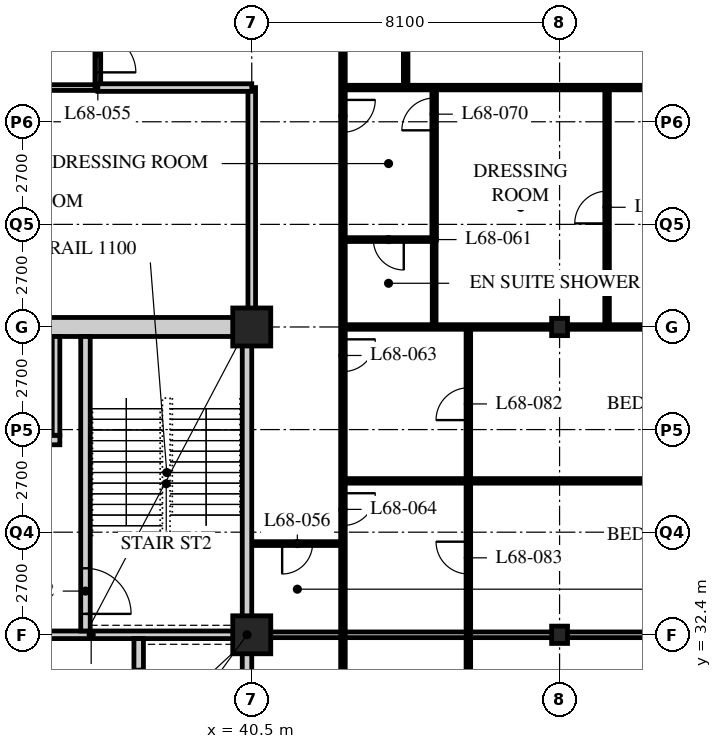
"""IFC4 building model, lengths in metres.
Left out: names, types, materials, properties, quantities, classifications, styles, units other than length and angle.
Written with IfcOpenShell. Run it as: python <this file> out.ifc"""

import sys

from ifc_helpers import new_model, si_unit, direction, frame, frame_2d, origin, origin_2d, place, context, subcontext, project, spatial, rectangle, hollow_rectangle, i_section, extrude, element, fill, save


model = new_model("IFC4")
c1 = context("Model", 3, precision=1e-05, world=origin(), true_north=direction((0.0, 1.0)))
c2 = subcontext(c1, "Body", "Model", "MODEL_VIEW")
j1 = project(units=[si_unit("LENGTHUNIT", "METRE"), si_unit("PLANEANGLEUNIT", "RADIAN")], contexts=[c1])
p1 = place(None, origin())
s1 = spatial("IfcSite", under=j1, at=p1, CompositionType="ELEMENT")
p2 = place(p1, origin())
s2 = spatial("IfcBuilding", under=s1, at=p2, CompositionType="ELEMENT")
p3 = place(p2, frame((0.0, 0.0, 265.8)))
s3 = spatial("IfcBuildingStorey", under=s2, at=p3, CompositionType="ELEMENT", Elevation=265.8)
for number, where, z_axis, x_axis in (
    (1, (40.5, 32.4, 0.0), (0.0, 0.0, 1.0), (1.0, 0.0, 0.0)),
    (2, (40.5, 40.5, 0.0), (0.0, 0.0, 1.0), (1.0, 0.0, 0.0)),
):
    element("IfcColumn", number, at=place(p3, frame(where, z_axis=z_axis, x_axis=x_axis)), inside=s3, PredefinedType="COLUMN", context=c2, shape_type="SweptSolid", body=[
        extrude(hollow_rectangle(XDim=1.0, YDim=1.0, WallThickness=0.1, at=origin_2d()), origin(), (0.0, 0.0, 1.0), 3.9),
    ])
for number, where, z_axis, x_axis in (
    (3, (48.6, 32.4, 0.0), (0.0, 0.0, 1.0), (1.0, 0.0, 0.0)),
    (4, (48.6, 40.5, 0.0), (0.0, 0.0, 1.0), (1.0, 0.0, 0.0)),
):
    element("IfcColumn", number, at=place(p3, frame(where, z_axis=z_axis, x_axis=x_axis)), inside=s3, PredefinedType="COLUMN", context=c2, shape_type="SweptSolid", body=[
        extrude(i_section(OverallWidth=0.418, OverallDepth=0.456, WebThickness=0.042, FlangeThickness=0.067, FilletRadius=0.015, at=origin_2d()), origin(), (0.0, 0.0, 1.0), 3.9),
    ])
p4 = place(p3, frame((29.56, 46.8, 0.0), z_axis=(0.0, 0.0, 1.0), x_axis=(1.0, 0.0, 0.0)))
e5 = element("IfcWall", 5, at=p4, inside=s3, PredefinedType="PARTITIONING", context=c2, shape_type="SweptSolid", body=[
    extrude(rectangle(XDim=6.89, YDim=0.15, at=frame_2d((3.445, 0.0))), origin(), (0.0, 0.0, 1.0), 3.69),
])
p5 = place(p4, frame((0.442, 0.0, 0.0)))
e6 = element("IfcOpeningElement", 6, at=p5, cuts=e5, PredefinedType="OPENING", context=c2, shape_type="SweptSolid", body=[
    extrude(rectangle(XDim=1.0, YDim=2.1, at=frame_2d((0.5, 1.05))), frame((0.0, 0.085, 0.0), z_axis=(0.0, -1.0, 0.0), x_axis=(1.0, 0.0, 0.0)), (0.0, 0.0, 1.0), 0.17),
])
p6 = place(p4, frame((3.642, 0.0, 0.0)))
e7 = element("IfcOpeningElement", 7, at=p6, cuts=e5, PredefinedType="OPENING", context=c2, shape_type="SweptSolid", body=[
    extrude(rectangle(XDim=1.0, YDim=2.1, at=frame_2d((0.5, 1.05))), frame((0.0, 0.085, 0.0), z_axis=(0.0, -1.0, 0.0), x_axis=(1.0, 0.0, 0.0)), (0.0, 0.0, 1.0), 0.17),
])
p7 = place(p3, frame((36.45, 46.8, 0.0), z_axis=(0.0, 0.0, 1.0), x_axis=(0.0, 1.0, 0.0)))
e8 = element("IfcWall", 8, at=p7, inside=s3, PredefinedType="PARTITIONING", context=c2, shape_type="SweptSolid", body=[
    extrude(rectangle(XDim=1.8, YDim=0.15, at=frame_2d((0.9, 0.0))), origin(), (0.0, 0.0, 1.0), 3.69),
])
p8 = place(p7, frame((0.4, 0.0, 0.0)))
e9 = element("IfcOpeningElement", 9, at=p8, cuts=e8, PredefinedType="OPENING", context=c2, shape_type="SweptSolid", body=[
    extrude(rectangle(XDim=1.0, YDim=2.1, at=frame_2d((0.5, 1.05))), frame((0.0, 0.085, 0.0), z_axis=(0.0, -1.0, 0.0), x_axis=(1.0, 0.0, 0.0)), (0.0, 0.0, 1.0), 0.17),
])
p9 = place(p3, frame((40.5, 40.5, 0.0), z_axis=(0.0, 0.0, 1.0), x_axis=(0.0, 1.0, 0.0)))
e10 = element("IfcWall", 10, at=p9, inside=s3, PredefinedType="SOLIDWALL", context=c2, shape_type="SweptSolid", body=[
    extrude(rectangle(XDim=6.3, YDim=0.2, at=frame_2d((3.15, 0.0))), origin(), (0.0, 0.0, 1.0), 3.078),
])
p10 = place(p3, frame((42.9, 22.5, 0.0), z_axis=(0.0, 0.0, 1.0), x_axis=(0.0, 1.0, 0.0)))
e11 = element("IfcWall", 11, at=p10, inside=s3, PredefinedType="PARTITIONING", context=c2, shape_type="SweptSolid", body=[
    extrude(rectangle(XDim=9.9, YDim=0.12, at=frame_2d((4.95, 0.0))), origin(), (0.0, 0.0, 1.0), 3.69),
])
p11 = place(p10, frame((2.125, 0.0, 0.0)))
e12 = element("IfcOpeningElement", 12, at=p11, cuts=e11, PredefinedType="OPENING", context=c2, shape_type="SweptSolid", body=[
    extrude(rectangle(XDim=0.85, YDim=2.1, at=frame_2d((0.425, 1.05))), frame((0.0, 0.07, 0.0), z_axis=(0.0, -1.0, 0.0), x_axis=(1.0, 0.0, 0.0)), (0.0, 0.0, 1.0), 0.14),
])
p12 = place(p10, frame((6.175, 0.0, 0.0)))
e13 = element("IfcOpeningElement", 13, at=p12, cuts=e11, PredefinedType="OPENING", context=c2, shape_type="SweptSolid", body=[
    extrude(rectangle(XDim=0.85, YDim=2.1, at=frame_2d((0.425, 1.05))), frame((0.0, 0.07, 0.0), z_axis=(0.0, -1.0, 0.0), x_axis=(1.0, 0.0, 0.0)), (0.0, 0.0, 1.0), 0.14),
])
p13 = place(p3, frame((40.5, 32.4, 0.0), z_axis=(0.0, 0.0, 1.0), x_axis=(1.0, 0.0, 0.0)))
e14 = element("IfcWall", 14, at=p13, inside=s3, PredefinedType="PARTITIONING", context=c2, shape_type="SweptSolid", body=[
    extrude(rectangle(XDim=15.9, YDim=0.15, at=frame_2d((7.95, 0.0))), origin(), (0.0, 0.0, 1.0), 3.078),
])
p14 = place(p3, frame((40.5, 34.8, 0.0), z_axis=(0.0, 0.0, 1.0), x_axis=(1.0, 0.0, 0.0)))
e15 = element("IfcWall", 15, at=p14, inside=s3, PredefinedType="PARTITIONING", context=c2, shape_type="SweptSolid", body=[
    extrude(rectangle(XDim=2.4, YDim=0.1, at=frame_2d((1.2, 0.0))), origin(), (0.0, 0.0, 1.0), 3.69),
])
p15 = place(p14, frame((0.8, 0.0, 0.0)))
e16 = element("IfcOpeningElement", 16, at=p15, cuts=e15, PredefinedType="OPENING", context=c2, shape_type="SweptSolid", body=[
    extrude(rectangle(XDim=0.8, YDim=2.1, at=frame_2d((0.4, 1.05))), frame((0.0, 0.06, 0.0), z_axis=(0.0, -1.0, 0.0), x_axis=(1.0, 0.0, 0.0)), (0.0, 0.0, 1.0), 0.12),
])
p16 = place(p3, frame((42.9, 48.6, 0.0), z_axis=(0.0, 0.0, 1.0), x_axis=(0.0, -1.0, 0.0)))
e17 = element("IfcWall", 17, at=p16, inside=s3, PredefinedType="PARTITIONING", context=c2, shape_type="SweptSolid", body=[
    extrude(rectangle(XDim=16.2, YDim=0.12, at=frame_2d((8.1, 0.0))), origin(), (0.0, 0.0, 1.0), 3.69),
])
p17 = place(p16, frame((2.125, 0.0, 0.0)))
e18 = element("IfcOpeningElement", 18, at=p17, cuts=e17, PredefinedType="OPENING", context=c2, shape_type="SweptSolid", body=[
    extrude(rectangle(XDim=0.85, YDim=2.1, at=frame_2d((0.425, 1.05))), frame((0.0, 0.07, 0.0), z_axis=(0.0, -1.0, 0.0), x_axis=(1.0, 0.0, 0.0)), (0.0, 0.0, 1.0), 0.14),
])
p18 = place(p16, frame((8.425, 0.0, 0.0)))
e19 = element("IfcOpeningElement", 19, at=p18, cuts=e17, PredefinedType="OPENING", context=c2, shape_type="SweptSolid", body=[
    extrude(rectangle(XDim=0.85, YDim=2.1, at=frame_2d((0.425, 1.05))), frame((0.0, 0.07, 0.0), z_axis=(0.0, -1.0, 0.0), x_axis=(1.0, 0.0, 0.0)), (0.0, 0.0, 1.0), 0.14),
])
p19 = place(p16, frame((12.475, 0.0, 0.0)))
e20 = element("IfcOpeningElement", 20, at=p19, cuts=e17, PredefinedType="OPENING", context=c2, shape_type="SweptSolid", body=[
    extrude(rectangle(XDim=0.85, YDim=2.1, at=frame_2d((0.425, 1.05))), frame((0.0, 0.07, 0.0), z_axis=(0.0, -1.0, 0.0), x_axis=(1.0, 0.0, 0.0)), (0.0, 0.0, 1.0), 0.14),
])
p20 = place(p3, frame((36.45, 46.8, 0.0), z_axis=(0.0, 0.0, 1.0), x_axis=(1.0, 0.0, 0.0)))
e21 = element("IfcWall", 21, at=p20, inside=s3, PredefinedType="SOLIDWALL", context=c2, shape_type="SweptSolid", body=[
    extrude(rectangle(XDim=4.05, YDim=0.2, at=frame_2d((2.025, 0.0))), origin(), (0.0, 0.0, 1.0), 3.69),
])
p21 = place(p3, frame((42.9, 46.8, 0.0), z_axis=(0.0, 0.0, 1.0), x_axis=(1.0, 0.0, 0.0)))
e22 = element("IfcWall", 22, at=p21, inside=s3, PredefinedType="PARTITIONING", context=c2, shape_type="SweptSolid", body=[
    extrude(rectangle(XDim=13.5, YDim=0.12, at=frame_2d((6.75, 0.0))), origin(), (0.0, 0.0, 1.0), 3.69),
])
p22 = place(p3, frame((44.55, 64.5, 0.0), z_axis=(0.0, 0.0, 1.0), x_axis=(0.0, -1.0, 0.0)))
e23 = element("IfcWall", 23, at=p22, inside=s3, PredefinedType="PARTITIONING", context=c2, shape_type="SweptSolid", body=[
    extrude(rectangle(XDim=17.7, YDim=0.12, at=frame_2d((8.85, 0.0))), origin(), (0.0, 0.0, 1.0), 3.69),
])
p23 = place(p22, frame((12.475, 0.0, 0.0)))
e24 = element("IfcOpeningElement", 24, at=p23, cuts=e23, PredefinedType="OPENING", context=c2, shape_type="SweptSolid", body=[
    extrude(rectangle(XDim=0.85, YDim=2.1, at=frame_2d((0.425, 1.05))), frame((0.0, 0.07, 0.0), z_axis=(0.0, -1.0, 0.0), x_axis=(1.0, 0.0, 0.0)), (0.0, 0.0, 1.0), 0.14),
])
p24 = place(p22, frame((4.525, 0.0, 0.0)))
e25 = element("IfcOpeningElement", 25, at=p24, cuts=e23, PredefinedType="OPENING", context=c2, shape_type="SweptSolid", body=[
    extrude(rectangle(XDim=0.85, YDim=2.1, at=frame_2d((0.425, 1.05))), frame((0.0, 0.07, 0.0), z_axis=(0.0, -1.0, 0.0), x_axis=(1.0, 0.0, 0.0)), (0.0, 0.0, 1.0), 0.14),
])
p25 = place(p3, frame((42.9, 42.8, 0.0), z_axis=(0.0, 0.0, 1.0), x_axis=(1.0, 0.0, 0.0)))
e26 = element("IfcWall", 26, at=p25, inside=s3, PredefinedType="PARTITIONING", context=c2, shape_type="SweptSolid", body=[
    extrude(rectangle(XDim=2.4, YDim=0.1, at=frame_2d((1.2, 0.0))), origin(), (0.0, 0.0, 1.0), 3.69),
])
p26 = place(p25, frame((0.8, 0.0, 0.0)))
e27 = element("IfcOpeningElement", 27, at=p26, cuts=e26, PredefinedType="OPENING", context=c2, shape_type="SweptSolid", body=[
    extrude(rectangle(XDim=0.8, YDim=2.1, at=frame_2d((0.4, 1.05))), frame((0.0, 0.06, 0.0), z_axis=(0.0, -1.0, 0.0), x_axis=(1.0, 0.0, 0.0)), (0.0, 0.0, 1.0), 0.12),
])
p27 = place(p3, frame((45.3, 42.8, 0.0), z_axis=(0.0, 0.0, 1.0), x_axis=(0.0, -1.0, 0.0)))
e28 = element("IfcWall", 28, at=p27, inside=s3, PredefinedType="PARTITIONING", context=c2, shape_type="SweptSolid", body=[
    extrude(rectangle(XDim=2.3, YDim=0.1, at=frame_2d((1.15, 0.0))), origin(), (0.0, 0.0, 1.0), 3.69),
])
p28 = place(p3, frame((42.9, 40.5, 0.0), z_axis=(0.0, 0.0, 1.0), x_axis=(1.0, 0.0, 0.0)))
e29 = element("IfcWall", 29, at=p28, inside=s3, PredefinedType="PARTITIONING", context=c2, shape_type="SweptSolid", body=[
    extrude(rectangle(XDim=13.5, YDim=0.12, at=frame_2d((6.75, 0.0))), origin(), (0.0, 0.0, 1.0), 3.078),
])
p29 = place(p3, frame((42.9, 36.45, 0.0), z_axis=(0.0, 0.0, 1.0), x_axis=(1.0, 0.0, 0.0)))
e30 = element("IfcWall", 30, at=p29, inside=s3, PredefinedType="PARTITIONING", context=c2, shape_type="SweptSolid", body=[
    extrude(rectangle(XDim=13.5, YDim=0.12, at=frame_2d((6.75, 0.0))), origin(), (0.0, 0.0, 1.0), 3.69),
])
p30 = place(p3, frame((45.3, 46.8, 0.0), z_axis=(0.0, 0.0, 1.0), x_axis=(0.0, -1.0, 0.0)))
e31 = element("IfcWall", 31, at=p30, inside=s3, PredefinedType="PARTITIONING", context=c2, shape_type="SweptSolid", body=[
    extrude(rectangle(XDim=4.01, YDim=0.12, at=frame_2d((2.005, 0.0))), origin(), (0.0, 0.0, 1.0), 3.69),
])
p31 = place(p30, frame((0.275, 0.0, 0.0)))
e32 = element("IfcOpeningElement", 32, at=p31, cuts=e31, PredefinedType="OPENING", context=c2, shape_type="SweptSolid", body=[
    extrude(rectangle(XDim=0.85, YDim=2.1, at=frame_2d((0.425, 1.05))), frame((0.0, 0.07, 0.0), z_axis=(0.0, -1.0, 0.0), x_axis=(1.0, 0.0, 0.0)), (0.0, 0.0, 1.0), 0.14),
])
p32 = place(p3, frame((46.2, 28.35, 0.0), z_axis=(0.0, 0.0, 1.0), x_axis=(0.0, 1.0, 0.0)))
e33 = element("IfcWall", 33, at=p32, inside=s3, PredefinedType="PARTITIONING", context=c2, shape_type="SweptSolid", body=[
    extrude(rectangle(XDim=12.15, YDim=0.12, at=frame_2d((6.075, 0.0))), origin(), (0.0, 0.0, 1.0), 3.69),
])
p33 = place(p32, frame((1.6, 0.0, 0.0)))
e34 = element("IfcOpeningElement", 34, at=p33, cuts=e33, PredefinedType="OPENING", context=c2, shape_type="SweptSolid", body=[
    extrude(rectangle(XDim=0.85, YDim=2.1, at=frame_2d((0.425, 1.05))), frame((0.0, 0.07, 0.0), z_axis=(0.0, -1.0, 0.0), x_axis=(1.0, 0.0, 0.0)), (0.0, 0.0, 1.0), 0.14),
])
p34 = place(p32, frame((9.7, 0.0, 0.0)))
e35 = element("IfcOpeningElement", 35, at=p34, cuts=e33, PredefinedType="OPENING", context=c2, shape_type="SweptSolid", body=[
    extrude(rectangle(XDim=0.85, YDim=2.1, at=frame_2d((0.425, 1.05))), frame((0.0, 0.07, 0.0), z_axis=(0.0, -1.0, 0.0), x_axis=(1.0, 0.0, 0.0)), (0.0, 0.0, 1.0), 0.14),
])
p35 = place(p32, frame((5.65, 0.0, 0.0)))
e36 = element("IfcOpeningElement", 36, at=p35, cuts=e33, PredefinedType="OPENING", context=c2, shape_type="SweptSolid", body=[
    extrude(rectangle(XDim=0.85, YDim=2.1, at=frame_2d((0.425, 1.05))), frame((0.0, 0.07, 0.0), z_axis=(0.0, -1.0, 0.0), x_axis=(1.0, 0.0, 0.0)), (0.0, 0.0, 1.0), 0.14),
])
p36 = place(p3, frame((49.85, 40.5, 0.0), z_axis=(0.0, 0.0, 1.0), x_axis=(0.0, 1.0, 0.0)))
e37 = element("IfcWall", 37, at=p36, inside=s3, PredefinedType="PARTITIONING", context=c2, shape_type="SweptSolid", body=[
    extrude(rectangle(XDim=6.3, YDim=0.12, at=frame_2d((3.15, 0.0))), origin(), (0.0, 0.0, 1.0), 3.69),
])
p37 = place(p36, frame((2.725, 0.0, 0.0)))
e38 = element("IfcOpeningElement", 38, at=p37, cuts=e37, PredefinedType="OPENING", context=c2, shape_type="SweptSolid", body=[
    extrude(rectangle(XDim=0.85, YDim=2.1, at=frame_2d((0.425, 1.05))), frame((0.0, 0.07, 0.0), z_axis=(0.0, -1.0, 0.0), x_axis=(1.0, 0.0, 0.0)), (0.0, 0.0, 1.0), 0.14),
])
p38 = place(p3, frame((15.95, 40.5, 0.0), z_axis=(0.0, 0.0, 1.0), x_axis=(1.0, 0.0, 0.0)))
e39 = element("IfcWall", 39, at=p38, inside=s3, PredefinedType="SOLIDWALL", context=c2, shape_type="SweptSolid", body=[
    extrude(rectangle(XDim=24.55, YDim=0.5, at=frame_2d((12.275, 0.0))), origin(), (0.0, 0.0, 1.0), 3.04),
])
p39 = place(p38, frame((11.5, 0.0, 0.0)))
e40 = element("IfcOpeningElement", 40, at=p39, cuts=e39, PredefinedType="OPENING", context=c2, shape_type="SweptSolid", body=[
    extrude(rectangle(XDim=1.8, YDim=2.4, at=frame_2d((0.9, 1.2))), frame((0.0, 0.26, 0.0), z_axis=(0.0, -1.0, 0.0), x_axis=(1.0, 0.0, 0.0)), (0.0, 0.0, 1.0), 0.52),
])
p40 = place(p3, frame((40.375, 24.55, 0.0), z_axis=(0.0, 0.0, 1.0), x_axis=(0.0, 1.0, 0.0)))
e41 = element("IfcWall", 41, at=p40, inside=s3, PredefinedType="SOLIDWALL", context=c2, shape_type="SweptSolid", body=[
    extrude(rectangle(XDim=15.7, YDim=0.25, at=frame_2d((7.85, 0.0))), origin(), (0.0, 0.0, 1.0), 3.078),
])
p41 = place(p3, frame((32.3, 32.4, 0.0), z_axis=(0.0, 0.0, 1.0), x_axis=(1.0, 0.0, 0.0)))
e42 = element("IfcWall", 42, at=p41, inside=s3, PredefinedType="SOLIDWALL", context=c2, shape_type="SweptSolid", body=[
    extrude(rectangle(XDim=7.95, YDim=0.2, at=frame_2d((3.975, 0.0))), origin(), (0.0, 0.0, 1.0), 3.078),
])
p42 = place(p3, frame((37.525, 24.55, 0.0), z_axis=(0.0, 0.0, 1.0), x_axis=(0.0, 1.0, 0.0)))
e43 = element("IfcWall", 43, at=p42, inside=s3, PredefinedType="SOLIDWALL", context=c2, shape_type="SweptSolid", body=[
    extrude(rectangle(XDim=7.75, YDim=0.25, at=frame_2d((3.875, 0.0))), origin(), (0.0, 0.0, 1.0), 3.69),
])
p43 = place(p42, frame((0.65, 0.0, 0.0)))
e44 = element("IfcOpeningElement", 44, at=p43, cuts=e43, PredefinedType="OPENING", context=c2, shape_type="SweptSolid", body=[
    extrude(rectangle(XDim=1.1, YDim=2.4, at=frame_2d((0.55, 1.2))), frame((0.0, 0.135, 0.0), z_axis=(0.0, -1.0, 0.0), x_axis=(1.0, 0.0, 0.0)), (0.0, 0.0, 1.0), 0.27),
])
p44 = place(p42, frame((3.25, 0.0, 0.0)))
e45 = element("IfcOpeningElement", 45, at=p44, cuts=e43, PredefinedType="OPENING", context=c2, shape_type="SweptSolid", body=[
    extrude(rectangle(XDim=1.1, YDim=2.4, at=frame_2d((0.55, 1.2))), frame((0.0, 0.135, 0.0), z_axis=(0.0, -1.0, 0.0), x_axis=(1.0, 0.0, 0.0)), (0.0, 0.0, 1.0), 0.27),
])
p45 = place(p42, frame((5.85, 0.0, 0.0)))
e46 = element("IfcOpeningElement", 46, at=p45, cuts=e43, PredefinedType="OPENING", context=c2, shape_type="SweptSolid", body=[
    extrude(rectangle(XDim=1.1, YDim=2.4, at=frame_2d((0.55, 1.2))), frame((0.0, 0.135, 0.0), z_axis=(0.0, -1.0, 0.0), x_axis=(1.0, 0.0, 0.0)), (0.0, 0.0, 1.0), 0.27),
])
p46 = place(p3, frame((36.125, 32.5, 0.0), z_axis=(0.0, 0.0, 1.0), x_axis=(0.0, 1.0, 0.0)))
e47 = element("IfcWall", 47, at=p46, inside=s3, PredefinedType="SOLIDWALL", context=c2, shape_type="SweptSolid", body=[
    extrude(rectangle(XDim=7.75, YDim=0.25, at=frame_2d((3.875, 0.0))), origin(), (0.0, 0.0, 1.0), 3.69),
])
p47 = place(p46, frame((0.45, 0.0, 0.0)))
e48 = element("IfcOpeningElement", 48, at=p47, cuts=e47, PredefinedType="OPENING", context=c2, shape_type="SweptSolid", body=[
    extrude(rectangle(XDim=1.2, YDim=2.1, at=frame_2d((0.6, 1.05))), frame((0.0, 0.135, 0.0), z_axis=(0.0, -1.0, 0.0), x_axis=(1.0, 0.0, 0.0)), (0.0, 0.0, 1.0), 0.27),
])
p48 = place(p3, frame((32.5, 37.525, 0.0), z_axis=(0.0, 0.0, 1.0), x_axis=(1.0, 0.0, 0.0)))
e49 = element("IfcWall", 49, at=p48, inside=s3, PredefinedType="SOLIDWALL", context=c2, shape_type="SweptSolid", body=[
    extrude(rectangle(XDim=2.95, YDim=0.25, at=frame_2d((1.475, 0.0))), origin(), (0.0, 0.0, 1.0), 3.69),
])
p49 = place(p48, frame((0.9, 0.0, 0.0)))
e50 = element("IfcOpeningElement", 50, at=p49, cuts=e49, PredefinedType="OPENING", context=c2, shape_type="SweptSolid", body=[
    extrude(rectangle(XDim=1.1, YDim=2.4, at=frame_2d((0.55, 1.2))), frame((0.0, 0.135, 0.0), z_axis=(0.0, -1.0, 0.0), x_axis=(1.0, 0.0, 0.0)), (0.0, 0.0, 1.0), 0.27),
])
p50 = place(p3, frame((35.35, 37.65, 0.0), z_axis=(0.0, 0.0, 1.0), x_axis=(0.0, 1.0, 0.0)))
e51 = element("IfcWall", 51, at=p50, inside=s3, PredefinedType="SOLIDWALL", context=c2, shape_type="SweptSolid", body=[
    extrude(rectangle(XDim=2.6, YDim=0.2, at=frame_2d((1.3, 0.0))), origin(), (0.0, 0.0, 1.0), 3.69),
])
p51 = place(p8, origin())
e52 = element("IfcDoor", 52, at=p51, inside=s3, OperationType="SINGLE_SWING_RIGHT", PredefinedType="DOOR", context=c2, shape_type="SweptSolid", body=[
    extrude(rectangle(XDim=1.0, YDim=2.1, at=frame_2d((0.5, 1.05))), frame((0.0, 0.025, 0.0), z_axis=(0.0, -1.0, 0.0), x_axis=(1.0, 0.0, 0.0)), (0.0, 0.0, 1.0), 0.05),
])
fill(e9, e52)
p52 = place(p15, origin())
e53 = element("IfcDoor", 53, at=p52, inside=s3, OperationType="SINGLE_SWING_RIGHT", PredefinedType="DOOR", context=c2, shape_type="SweptSolid", body=[
    extrude(rectangle(XDim=0.8, YDim=2.1, at=frame_2d((0.4, 1.05))), frame((0.0, 0.025, 0.0), z_axis=(0.0, -1.0, 0.0), x_axis=(1.0, 0.0, 0.0)), (0.0, 0.0, 1.0), 0.05),
])
fill(e16, e53)
p53 = place(p26, origin())
e54 = element("IfcDoor", 54, at=p53, inside=s3, OperationType="SINGLE_SWING_LEFT", PredefinedType="DOOR", context=c2, shape_type="SweptSolid", body=[
    extrude(rectangle(XDim=0.8, YDim=2.1, at=frame_2d((0.4, 1.05))), frame((0.0, 0.025, 0.0), z_axis=(0.0, -1.0, 0.0), x_axis=(1.0, 0.0, 0.0)), (0.0, 0.0, 1.0), 0.05),
])
fill(e27, e54)
p54 = place(p17, origin())
e55 = element("IfcDoor", 55, at=p54, inside=s3, OperationType="SINGLE_SWING_LEFT", PredefinedType="DOOR", context=c2, shape_type="SweptSolid", body=[
    extrude(rectangle(XDim=0.85, YDim=2.1, at=frame_2d((0.425, 1.05))), frame((0.0, 0.025, 0.0), z_axis=(0.0, -1.0, 0.0), x_axis=(1.0, 0.0, 0.0)), (0.0, 0.0, 1.0), 0.05),
])
fill(e18, e55)
p55 = place(p18, origin())
e56 = element("IfcDoor", 56, at=p55, inside=s3, OperationType="SINGLE_SWING_LEFT", PredefinedType="DOOR", context=c2, shape_type="SweptSolid", body=[
    extrude(rectangle(XDim=0.85, YDim=2.1, at=frame_2d((0.425, 1.05))), frame((0.0, 0.025, 0.0), z_axis=(0.0, -1.0, 0.0), x_axis=(1.0, 0.0, 0.0)), (0.0, 0.0, 1.0), 0.05),
])
fill(e19, e56)
p56 = place(p19, origin())
e57 = element("IfcDoor", 57, at=p56, inside=s3, OperationType="SINGLE_SWING_LEFT", PredefinedType="DOOR", context=c2, shape_type="SweptSolid", body=[
    extrude(rectangle(XDim=0.85, YDim=2.1, at=frame_2d((0.425, 1.05))), frame((0.0, 0.025, 0.0), z_axis=(0.0, -1.0, 0.0), x_axis=(1.0, 0.0, 0.0)), (0.0, 0.0, 1.0), 0.05),
])
fill(e20, e57)
p57 = place(p31, origin())
e58 = element("IfcDoor", 58, at=p57, inside=s3, OperationType="SINGLE_SWING_LEFT", PredefinedType="DOOR", context=c2, shape_type="SweptSolid", body=[
    extrude(rectangle(XDim=0.85, YDim=2.1, at=frame_2d((0.425, 1.05))), frame((0.0, 0.025, 0.0), z_axis=(0.0, -1.0, 0.0), x_axis=(1.0, 0.0, 0.0)), (0.0, 0.0, 1.0), 0.05),
])
fill(e32, e58)
p58 = place(p37, origin())
e59 = element("IfcDoor", 59, at=p58, inside=s3, OperationType="SINGLE_SWING_LEFT", PredefinedType="DOOR", context=c2, shape_type="SweptSolid", body=[
    extrude(rectangle(XDim=0.85, YDim=2.1, at=frame_2d((0.425, 1.05))), frame((0.0, 0.025, 0.0), z_axis=(0.0, -1.0, 0.0), x_axis=(1.0, 0.0, 0.0)), (0.0, 0.0, 1.0), 0.05),
])
fill(e38, e59)
p59 = place(p34, origin())
e60 = element("IfcDoor", 60, at=p59, inside=s3, OperationType="SINGLE_SWING_LEFT", PredefinedType="DOOR", context=c2, shape_type="SweptSolid", body=[
    extrude(rectangle(XDim=0.85, YDim=2.1, at=frame_2d((0.425, 1.05))), frame((0.0, 0.025, 0.0), z_axis=(0.0, -1.0, 0.0), x_axis=(1.0, 0.0, 0.0)), (0.0, 0.0, 1.0), 0.05),
])
fill(e35, e60)
p60 = place(p35, origin())
e61 = element("IfcDoor", 61, at=p60, inside=s3, OperationType="SINGLE_SWING_RIGHT", PredefinedType="DOOR", context=c2, shape_type="SweptSolid", body=[
    extrude(rectangle(XDim=0.85, YDim=2.1, at=frame_2d((0.425, 1.05))), frame((0.0, 0.025, 0.0), z_axis=(0.0, -1.0, 0.0), x_axis=(1.0, 0.0, 0.0)), (0.0, 0.0, 1.0), 0.05),
])
fill(e36, e61)
p61 = place(p47, origin())
e62 = element("IfcDoor", 62, at=p61, inside=s3, OperationType="SINGLE_SWING_RIGHT", PredefinedType="DOOR", context=c2, shape_type="SweptSolid", body=[
    extrude(rectangle(XDim=1.2, YDim=2.1, at=frame_2d((0.6, 1.05))), frame((0.0, 0.025, 0.0), z_axis=(0.0, -1.0, 0.0), x_axis=(1.0, 0.0, 0.0)), (0.0, 0.0, 1.0), 0.05),
])
fill(e48, e62)
p62 = place(p45, origin())
e63 = element("IfcDoor", 63, at=p62, inside=s3, OperationType="DOUBLE_DOOR_SLIDING", PredefinedType="DOOR", context=c2, shape_type="SweptSolid", body=[
    extrude(rectangle(XDim=1.1, YDim=2.4, at=frame_2d((0.55, 1.2))), frame((0.0, 0.025, 0.0), z_axis=(0.0, -1.0, 0.0), x_axis=(1.0, 0.0, 0.0)), (0.0, 0.0, 1.0), 0.05),
])
fill(e46, e63)
save(model, sys.argv[1])
